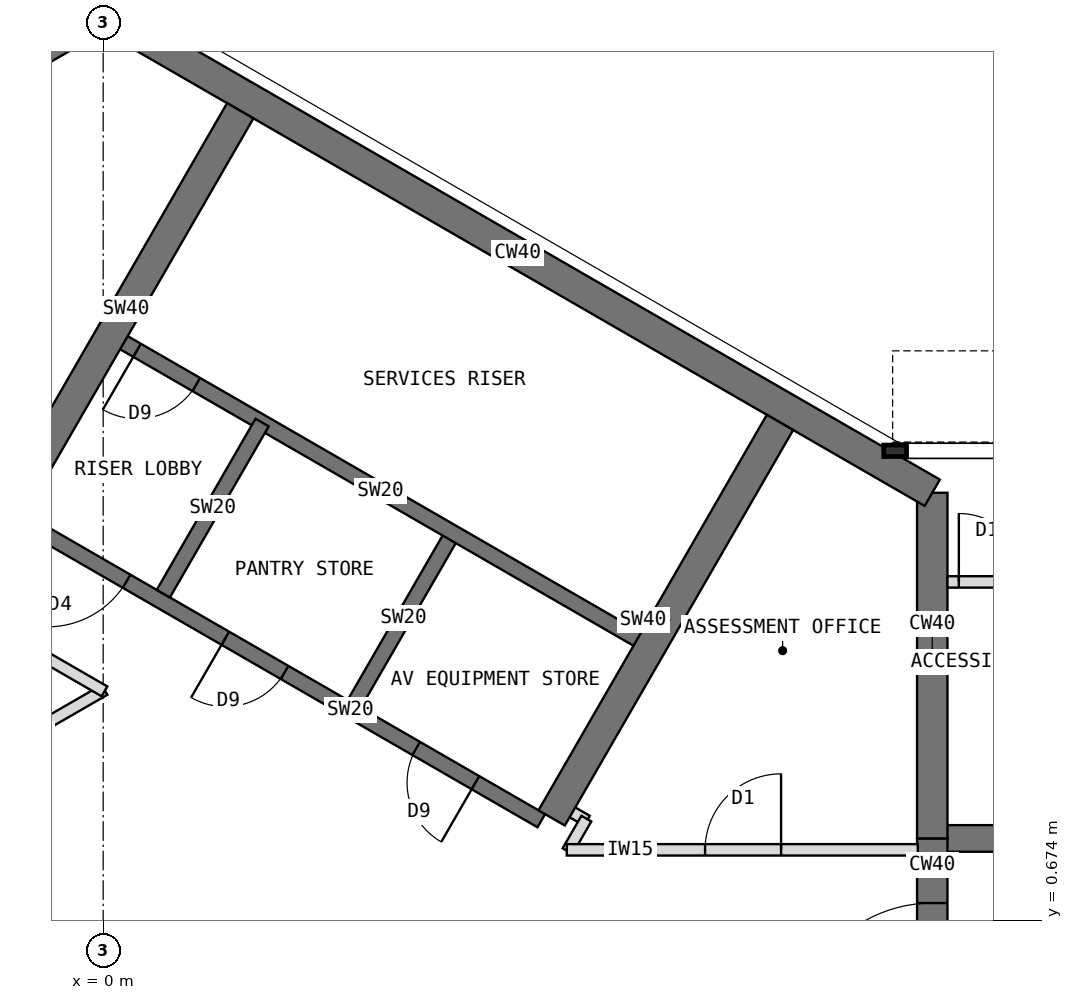
"""IFC4 building model, lengths in metres.
Left out: names, types, materials, properties, quantities, classifications, styles, units other than length and angle.
Written with IfcOpenShell. Run it as: python <this file> out.ifc"""

import sys

from ifc_helpers import new_model, si_unit, direction, frame, frame_2d, origin, place, context, subcontext, project, spatial, rectangle, extrude, element, fill, save


model = new_model("IFC4")
c1 = context("Model", 3, precision=1e-05, world=origin(), true_north=direction((0.0, 1.0)))
c2 = subcontext(c1, "Body", "Model", "MODEL_VIEW")
j1 = project(units=[si_unit("LENGTHUNIT", "METRE"), si_unit("PLANEANGLEUNIT", "RADIAN")], contexts=[c1])
p1 = place(None, origin())
s1 = spatial("IfcSite", under=j1, at=p1, CompositionType="ELEMENT")
p2 = place(p1, origin())
s2 = spatial("IfcBuilding", under=s1, at=p2, CompositionType="ELEMENT")
p3 = place(p2, frame((0.0, 0.0, 255.5)))
s3 = spatial("IfcBuildingStorey", under=s2, at=p3, CompositionType="ELEMENT", Elevation=255.5)
p4 = place(p3, frame((10.908, -1.75, 0.0), z_axis=(0.0, 0.0, 1.0), x_axis=(0.0, 1.0, 0.0)))
e1 = element("IfcWall", 1, at=p4, inside=s3, PredefinedType="SHEAR", context=c2, shape_type="SweptSolid", body=[
    extrude(rectangle(XDim=3.5, YDim=0.4, at=frame_2d((1.75, 0.0))), origin(), (0.0, 0.0, 1.0), 4.0),
])
p5 = place(p4, frame((0.85, 0.0, 0.0)))
e2 = element("IfcOpeningElement", 2, at=p5, cuts=e1, PredefinedType="OPENING", context=c2, shape_type="SweptSolid", body=[
    extrude(rectangle(XDim=1.8, YDim=2.1, at=frame_2d((0.9, 1.05))), frame((0.0, 0.21, 0.0), z_axis=(0.0, -1.0, 0.0), x_axis=(1.0, 0.0, 0.0)), (0.0, 0.0, 1.0), 0.42),
])
p6 = place(p3, frame((10.908, 1.75, 0.0), z_axis=(0.0, 0.0, 1.0), x_axis=(0.0, 1.0, 0.0)))
e3 = element("IfcWall", 3, at=p6, inside=s3, PredefinedType="SHEAR", context=c2, shape_type="SweptSolid", body=[
    extrude(rectangle(XDim=4.548, YDim=0.4, at=frame_2d((2.274, 0.0))), origin(), (0.0, 0.0, 1.0), 4.0),
])
p7 = place(p3, frame((10.908, 6.298, 0.0), z_axis=(0.0, 0.0, 1.0), x_axis=(-0.866021940709, 0.500005998175, 0.0)))
e4 = element("IfcWall", 4, at=p7, inside=s3, PredefinedType="SHEAR", context=c2, shape_type="SweptSolid", body=[
    extrude(rectangle(XDim=12.596, YDim=0.4, at=frame_2d((6.298, 0.0))), origin(), (0.0, 0.0, 1.0), 4.0),
])
p8 = place(p3, frame((0.0, 12.596, 0.0), z_axis=(0.0, 0.0, 1.0), x_axis=(-0.866011268655, -0.500024481964, 0.0)))
e5 = element("IfcWall", 5, at=p8, inside=s3, PredefinedType="SHEAR", context=c2, shape_type="SweptSolid", body=[
    extrude(rectangle(XDim=4.548, YDim=0.4, at=frame_2d((2.274, 0.0))), origin(), (0.0, 0.0, 1.0), 4.0),
])
p9 = place(p3, frame((10.908, 1.75, 0.0), z_axis=(0.0, 0.0, 1.0), x_axis=(1.0, 0.0, 0.0)))
e6 = element("IfcWall", 6, at=p9, inside=s3, PredefinedType="SHEAR", context=c2, shape_type="SweptSolid", body=[
    extrude(rectangle(XDim=2.592, YDim=0.35, at=frame_2d((1.296, 0.0))), origin(), (0.0, 0.0, 1.0), 4.0),
])
p10 = place(p3, frame((5.764, 1.984, 0.0), z_axis=(0.0, 0.0, 1.0), x_axis=(-0.866026010844, 0.49999894854, 0.0)))
e7 = element("IfcWall", 7, at=p10, inside=s3, PredefinedType="SHEAR", context=c2, shape_type="SweptSolid", body=[
    extrude(rectangle(XDim=8.0, YDim=0.2, at=frame_2d((4.0, 0.0))), origin(), (0.0, 0.0, 1.0), 4.0),
])
p11 = place(p10, frame((6.3, 0.0, 0.0)))
e8 = element("IfcOpeningElement", 8, at=p11, cuts=e7, PredefinedType="OPENING", context=c2, shape_type="SweptSolid", body=[
    extrude(rectangle(XDim=1.2, YDim=2.1, at=frame_2d((0.6, 1.05))), frame((0.0, 0.11, 0.0), z_axis=(0.0, -1.0, 0.0), x_axis=(1.0, 0.0, 0.0)), (0.0, 0.0, 1.0), 0.22),
])
p12 = place(p10, frame((1.0, 0.0, 0.0)))
e9 = element("IfcOpeningElement", 9, at=p12, cuts=e7, PredefinedType="OPENING", context=c2, shape_type="SweptSolid", body=[
    extrude(rectangle(XDim=0.9, YDim=2.1, at=frame_2d((0.45, 1.05))), frame((0.0, 0.11, 0.0), z_axis=(0.0, -1.0, 0.0), x_axis=(1.0, 0.0, 0.0)), (0.0, 0.0, 1.0), 0.22),
])
p13 = place(p10, frame((3.9, 0.0, 0.0)))
e10 = element("IfcOpeningElement", 10, at=p13, cuts=e7, PredefinedType="OPENING", context=c2, shape_type="SweptSolid", body=[
    extrude(rectangle(XDim=0.9, YDim=2.1, at=frame_2d((0.45, 1.05))), frame((0.0, 0.11, 0.0), z_axis=(0.0, -1.0, 0.0), x_axis=(1.0, 0.0, 0.0)), (0.0, 0.0, 1.0), 0.22),
])
for number, where, z_axis, x_axis in (
    (11, (3.303, 3.52, 0.0), (0.0, 0.0, 1.0), (0.5, 0.866, 0.0)),
    (12, (0.791, 4.97, 0.0), (0.0, 0.0, 1.0), (0.5, 0.866, 0.0)),
):
    element("IfcWall", number, at=place(p3, frame(where, z_axis=z_axis, x_axis=x_axis)), inside=s3, PredefinedType="SHEAR", context=c2, shape_type="SweptSolid", body=[
        extrude(rectangle(XDim=2.6, YDim=0.2, at=frame_2d((1.3, 0.0))), origin(), (0.0, 0.0, 1.0), 4.0),
    ])
p14 = place(p3, frame((7.114, 4.322, 0.0), z_axis=(0.0, 0.0, 1.0), x_axis=(-0.866026010844, 0.49999894854, 0.0)))
e13 = element("IfcWall", 13, at=p14, inside=s3, PredefinedType="SHEAR", context=c2, shape_type="SweptSolid", body=[
    extrude(rectangle(XDim=8.0, YDim=0.2, at=frame_2d((4.0, 0.0))), origin(), (0.0, 0.0, 1.0), 4.0),
])
p15 = place(p14, frame((6.8, 0.0, 0.0)))
e14 = element("IfcOpeningElement", 14, at=p15, cuts=e13, PredefinedType="OPENING", context=c2, shape_type="SweptSolid", body=[
    extrude(rectangle(XDim=0.9, YDim=2.1, at=frame_2d((0.45, 1.05))), frame((0.0, 0.11, 0.0), z_axis=(0.0, -1.0, 0.0), x_axis=(1.0, 0.0, 0.0)), (0.0, 0.0, 1.0), 0.22),
])
for number, where, z_axis, x_axis in (
    (15, (-1.201, 6.12, 0.0), (0.0, 0.0, 1.0), (0.5, 0.866, 0.0)),
    (16, (5.901, 2.02, 0.0), (0.0, 0.0, 1.0), (0.5, 0.866, 0.0)),
):
    element("IfcWall", number, at=place(p3, frame(where, z_axis=z_axis, x_axis=x_axis)), inside=s3, PredefinedType="SHEAR", context=c2, shape_type="SweptSolid", body=[
        extrude(rectangle(XDim=6.008, YDim=0.4, at=frame_2d((3.004, 0.0))), origin(), (0.0, 0.0, 1.0), 4.0),
    ])
p16 = place(p3, frame((11.108, 5.125, 0.0), z_axis=(0.0, 0.0, 1.0), x_axis=(1.0, 0.0, 0.0)))
e17 = element("IfcWall", 17, at=p16, inside=s3, PredefinedType="PARTITIONING", context=c2, shape_type="SweptSolid", body=[
    extrude(rectangle(XDim=2.4, YDim=0.15, at=frame_2d((1.2, 0.0))), origin(), (0.0, 0.0, 1.0), 3.8),
])
p17 = place(p16, frame((0.15, 0.0, 0.0)))
e18 = element("IfcOpeningElement", 18, at=p17, cuts=e17, PredefinedType="OPENING", context=c2, shape_type="SweptSolid", body=[
    extrude(rectangle(XDim=0.9, YDim=2.1, at=frame_2d((0.45, 1.05))), frame((0.0, 0.085, 0.0), z_axis=(0.0, -1.0, 0.0), x_axis=(1.0, 0.0, 0.0)), (0.0, 0.0, 1.0), 0.17),
])
p18 = place(p3, frame((-1.992, 2.545, 0.0), z_axis=(0.0, 0.0, 1.0), x_axis=(0.866059450854, 0.499941024108, 0.0)))
e19 = element("IfcWall", 19, at=p18, inside=s3, PredefinedType="PARTITIONING", context=c2, shape_type="SweptSolid", body=[
    extrude(rectangle(XDim=2.321, YDim=0.15, at=frame_2d((1.16, 0.0))), origin(), (0.0, 0.0, 1.0), 3.8),
])
p19 = place(p3, frame((0.017, 3.685, 0.0), z_axis=(0.0, 0.0, 1.0), x_axis=(-0.866036099759, 0.499981473571, 0.0)))
e20 = element("IfcWall", 20, at=p19, inside=s3, PredefinedType="PARTITIONING", context=c2, shape_type="SweptSolid", body=[
    extrude(rectangle(XDim=2.692, YDim=0.15, at=frame_2d((1.346, 0.0))), origin(), (0.0, 0.0, 1.0), 3.8),
])
p20 = place(p3, frame((5.992, 2.198, 0.0), z_axis=(0.0, 0.0, 1.0), x_axis=(0.865892400268, -0.500230298122, 0.0)))
e21 = element("IfcWall", 21, at=p20, inside=s3, PredefinedType="PARTITIONING", context=c2, shape_type="SweptSolid", body=[
    extrude(rectangle(XDim=0.43, YDim=0.15, at=frame_2d((0.215, 0.0))), origin(), (0.0, 0.0, 1.0), 3.8),
])
p21 = place(p3, frame((6.357, 2.011, 0.0), z_axis=(0.0, 0.0, 1.0), x_axis=(-0.50033519877, -0.865831790172, 0.0)))
e22 = element("IfcWall", 22, at=p21, inside=s3, PredefinedType="PARTITIONING", context=c2, shape_type="SweptSolid", body=[
    extrude(rectangle(XDim=0.494, YDim=0.15, at=frame_2d((0.247, 0.0))), origin(), (0.0, 0.0, 1.0), 3.8),
])
p22 = place(p3, frame((6.1, 1.6, 0.0), z_axis=(0.0, 0.0, 1.0), x_axis=(1.0, 0.0, 0.0)))
e23 = element("IfcWall", 23, at=p22, inside=s3, PredefinedType="PARTITIONING", context=c2, shape_type="SweptSolid", body=[
    extrude(rectangle(XDim=4.618, YDim=0.15, at=frame_2d((2.309, 0.0))), origin(), (0.0, 0.0, 1.0), 3.8),
])
p23 = place(p22, frame((1.819, 0.0, 0.0)))
e24 = element("IfcOpeningElement", 24, at=p23, cuts=e23, PredefinedType="OPENING", context=c2, shape_type="SweptSolid", body=[
    extrude(rectangle(XDim=1.0, YDim=2.1, at=frame_2d((0.5, 1.05))), frame((0.0, 0.085, 0.0), z_axis=(0.0, -1.0, 0.0), x_axis=(1.0, 0.0, 0.0)), (0.0, 0.0, 1.0), 0.17),
])
p24 = place(p11, origin())
e25 = element("IfcDoor", 25, at=p24, inside=s3, OperationType="SINGLE_SWING_RIGHT", PredefinedType="DOOR", context=c2, shape_type="SweptSolid", body=[
    extrude(rectangle(XDim=1.2, YDim=2.1, at=frame_2d((0.6, 1.05))), frame((0.0, 0.025, 0.0), z_axis=(0.0, -1.0, 0.0), x_axis=(1.0, 0.0, 0.0)), (0.0, 0.0, 1.0), 0.05),
])
fill(e8, e25)
p25 = place(p15, origin())
e26 = element("IfcDoor", 26, at=p25, inside=s3, OperationType="SINGLE_SWING_RIGHT", PredefinedType="DOOR", context=c2, shape_type="SweptSolid", body=[
    extrude(rectangle(XDim=0.9, YDim=2.1, at=frame_2d((0.45, 1.05))), frame((0.0, 0.025, 0.0), z_axis=(0.0, -1.0, 0.0), x_axis=(1.0, 0.0, 0.0)), (0.0, 0.0, 1.0), 0.05),
])
fill(e14, e26)
p26 = place(p5, origin())
e27 = element("IfcDoor", 27, at=p26, inside=s3, OperationType="DOUBLE_DOOR_DOUBLE_SWING", PredefinedType="DOOR", context=c2, shape_type="SweptSolid", body=[
    extrude(rectangle(XDim=1.8, YDim=2.1, at=frame_2d((0.9, 1.05))), frame((0.0, 0.025, 0.0), z_axis=(0.0, -1.0, 0.0), x_axis=(1.0, 0.0, 0.0)), (0.0, 0.0, 1.0), 0.05),
])
fill(e2, e27)
p27 = place(p17, origin())
e28 = element("IfcDoor", 28, at=p27, inside=s3, OperationType="SINGLE_SWING_LEFT", PredefinedType="DOOR", context=c2, shape_type="SweptSolid", body=[
    extrude(rectangle(XDim=0.9, YDim=2.1, at=frame_2d((0.45, 1.05))), frame((0.0, 0.025, 0.0), z_axis=(0.0, -1.0, 0.0), x_axis=(1.0, 0.0, 0.0)), (0.0, 0.0, 1.0), 0.05),
])
fill(e18, e28)
p28 = place(p23, origin())
e29 = element("IfcDoor", 29, at=p28, inside=s3, OperationType="SINGLE_SWING_RIGHT", PredefinedType="DOOR", context=c2, shape_type="SweptSolid", body=[
    extrude(rectangle(XDim=1.0, YDim=2.1, at=frame_2d((0.5, 1.05))), frame((0.0, 0.025, 0.0), z_axis=(0.0, -1.0, 0.0), x_axis=(1.0, 0.0, 0.0)), (0.0, 0.0, 1.0), 0.05),
])
fill(e24, e29)
p29 = place(p12, origin())
e30 = element("IfcDoor", 30, at=p29, inside=s3, OperationType="SINGLE_SWING_LEFT", PredefinedType="DOOR", context=c2, shape_type="SweptSolid", body=[
    extrude(rectangle(XDim=0.9, YDim=2.1, at=frame_2d((0.45, 1.05))), frame((0.0, 0.025, 0.0), z_axis=(0.0, -1.0, 0.0), x_axis=(1.0, 0.0, 0.0)), (0.0, 0.0, 1.0), 0.05),
])
fill(e9, e30)
p30 = place(p13, origin())
e31 = element("IfcDoor", 31, at=p30, inside=s3, OperationType="SINGLE_SWING_RIGHT", PredefinedType="DOOR", context=c2, shape_type="SweptSolid", body=[
    extrude(rectangle(XDim=0.9, YDim=2.1, at=frame_2d((0.45, 1.05))), frame((0.0, 0.025, 0.0), z_axis=(0.0, -1.0, 0.0), x_axis=(1.0, 0.0, 0.0)), (0.0, 0.0, 1.0), 0.05),
])
fill(e10, e31)
save(model, sys.argv[1])
